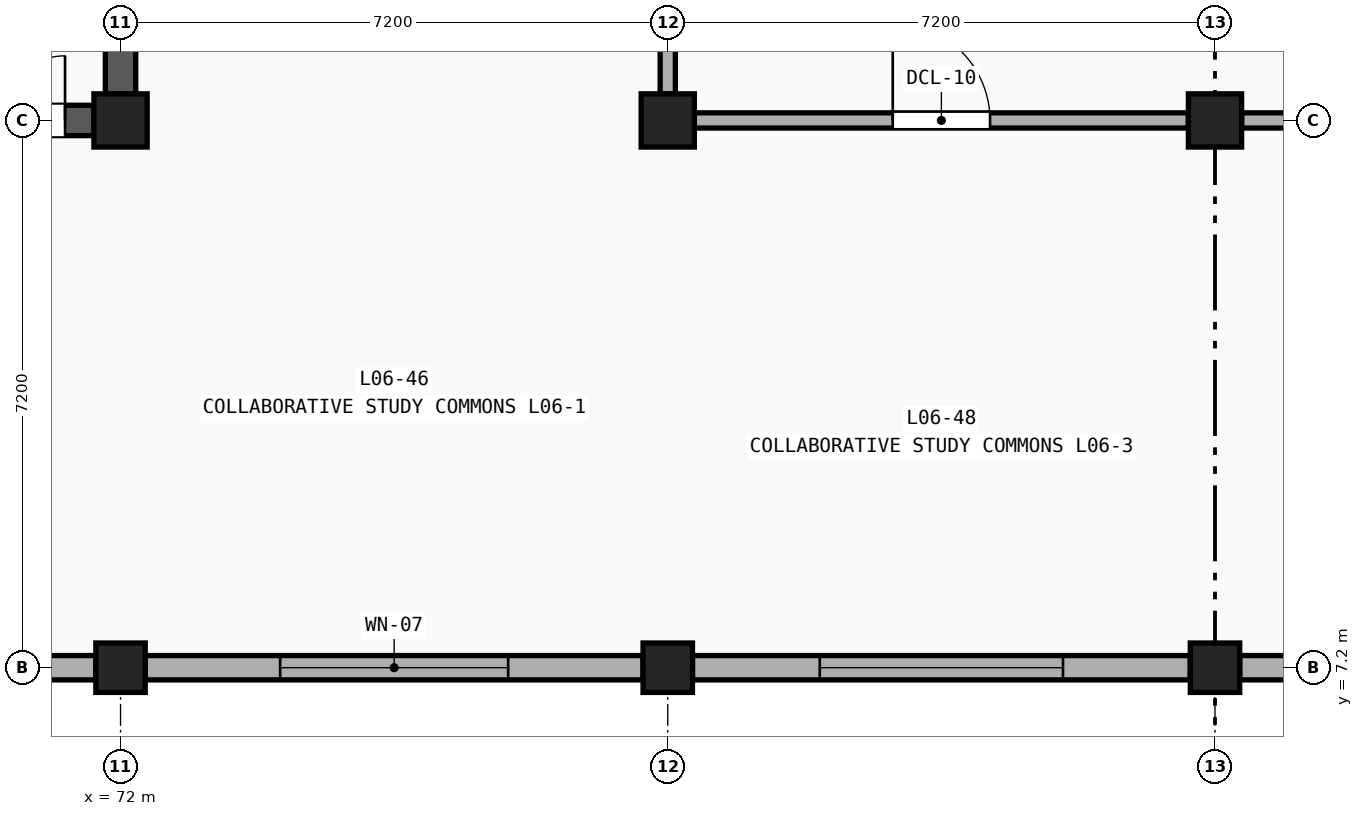
"""IFC4 building model, lengths in metres.
Left out: names, types, materials, properties, quantities, classifications, styles, units other than length and angle.
Written with IfcOpenShell. Run it as: python <this file> out.ifc"""

import sys

from ifc_helpers import new_model, si_unit, direction, frame, frame_2d, origin, origin_2d, place, context, subcontext, project, spatial, rectangle, extrude, element, fill, save


model = new_model("IFC4")
c1 = context("Model", 3, precision=1e-05, world=origin(), true_north=direction((0.0, 1.0)))
c2 = subcontext(c1, "Body", "Model", "MODEL_VIEW")
j1 = project(units=[si_unit("LENGTHUNIT", "METRE"), si_unit("PLANEANGLEUNIT", "RADIAN")], contexts=[c1])
p1 = place(None, origin())
s1 = spatial("IfcSite", under=j1, at=p1, CompositionType="ELEMENT")
p2 = place(p1, origin())
s2 = spatial("IfcBuilding", under=s1, at=p2, CompositionType="ELEMENT")
p3 = place(p2, frame((0.0, 0.0, 26.6)))
s3 = spatial("IfcBuildingStorey", under=s2, at=p3, CompositionType="ELEMENT", Elevation=26.6)
p4 = place(p3, frame((72.0, 7.2, 0.0), z_axis=(0.0, 0.0, 1.0), x_axis=(1.0, 0.0, 0.0)))
e1 = element("IfcColumn", 1, at=p4, inside=s3, PredefinedType="COLUMN", context=c2, shape_type="SweptSolid", body=[
    extrude(rectangle(XDim=0.65, YDim=0.65, at=origin_2d()), origin(), (0.0, 0.0, 1.0), 4.0),
])
p5 = place(p3, frame((72.0, 14.4, 0.0), z_axis=(0.0, 0.0, 1.0), x_axis=(1.0, 0.0, 0.0)))
e2 = element("IfcColumn", 2, at=p5, inside=s3, PredefinedType="COLUMN", context=c2, shape_type="SweptSolid", body=[
    extrude(rectangle(XDim=0.7, YDim=0.7, at=origin_2d()), origin(), (0.0, 0.0, 1.0), 4.0),
])
p6 = place(p3, frame((79.2, 7.2, 0.0), z_axis=(0.0, 0.0, 1.0), x_axis=(1.0, 0.0, 0.0)))
e3 = element("IfcColumn", 3, at=p6, inside=s3, PredefinedType="COLUMN", context=c2, shape_type="SweptSolid", body=[
    extrude(rectangle(XDim=0.65, YDim=0.65, at=origin_2d()), origin(), (0.0, 0.0, 1.0), 4.0),
])
p7 = place(p3, frame((79.2, 14.4, 0.0), z_axis=(0.0, 0.0, 1.0), x_axis=(1.0, 0.0, 0.0)))
e4 = element("IfcColumn", 4, at=p7, inside=s3, PredefinedType="COLUMN", context=c2, shape_type="SweptSolid", body=[
    extrude(rectangle(XDim=0.7, YDim=0.7, at=origin_2d()), origin(), (0.0, 0.0, 1.0), 4.0),
])
p8 = place(p3, frame((86.4, 7.2, 0.0), z_axis=(0.0, 0.0, 1.0), x_axis=(1.0, 0.0, 0.0)))
e5 = element("IfcColumn", 5, at=p8, inside=s3, PredefinedType="COLUMN", context=c2, shape_type="SweptSolid", body=[
    extrude(rectangle(XDim=0.65, YDim=0.65, at=origin_2d()), origin(), (0.0, 0.0, 1.0), 4.0),
])
p9 = place(p3, frame((86.4, 14.4, 0.0), z_axis=(0.0, 0.0, 1.0), x_axis=(1.0, 0.0, 0.0)))
e6 = element("IfcColumn", 6, at=p9, inside=s3, PredefinedType="COLUMN", context=c2, shape_type="SweptSolid", body=[
    extrude(rectangle(XDim=0.7, YDim=0.7, at=origin_2d()), origin(), (0.0, 0.0, 1.0), 4.0),
])
p10 = place(p3, frame((65.05, 7.2, 0.0), z_axis=(0.0, 0.0, 1.0), x_axis=(1.0, 0.0, 0.0)))
e7 = element("IfcWall", 7, at=p10, inside=s3, PredefinedType="SOLIDWALL", context=c2, shape_type="SweptSolid", body=[
    extrude(rectangle(XDim=6.625, YDim=0.32, at=frame_2d((3.312, 0.0))), origin(), (0.0, 0.0, 1.0), 3.1),
])
p11 = place(p10, frame((1.913, 0.0, 0.9)))
e8 = element("IfcOpeningElement", 8, at=p11, cuts=e7, PredefinedType="OPENING", context=c2, shape_type="SweptSolid", body=[
    extrude(rectangle(XDim=2.8, YDim=1.8, at=frame_2d((1.4, 0.9))), frame((0.0, 0.172, 0.0), z_axis=(0.0, -1.0, 0.0), x_axis=(1.0, 0.0, 0.0)), (0.0, 0.0, 1.0), 0.344),
])
p12 = place(p3, frame((72.325, 7.2, 0.0), z_axis=(0.0, 0.0, 1.0), x_axis=(1.0, 0.0, 0.0)))
e9 = element("IfcWall", 9, at=p12, inside=s3, PredefinedType="SOLIDWALL", context=c2, shape_type="SweptSolid", body=[
    extrude(rectangle(XDim=6.55, YDim=0.32, at=frame_2d((3.275, 0.0))), origin(), (0.0, 0.0, 1.0), 3.1),
])
p13 = place(p12, frame((1.775, 0.0, 0.9)))
e10 = element("IfcOpeningElement", 10, at=p13, cuts=e9, PredefinedType="OPENING", context=c2, shape_type="SweptSolid", body=[
    extrude(rectangle(XDim=3.0, YDim=1.8, at=frame_2d((1.5, 0.9))), frame((0.0, 0.172, 0.0), z_axis=(0.0, -1.0, 0.0), x_axis=(1.0, 0.0, 0.0)), (0.0, 0.0, 1.0), 0.344),
])
p14 = place(p3, frame((79.525, 7.2, 0.0), z_axis=(0.0, 0.0, 1.0), x_axis=(1.0, 0.0, 0.0)))
e11 = element("IfcWall", 11, at=p14, inside=s3, PredefinedType="SOLIDWALL", context=c2, shape_type="SweptSolid", body=[
    extrude(rectangle(XDim=6.55, YDim=0.32, at=frame_2d((3.275, 0.0))), origin(), (0.0, 0.0, 1.0), 3.1),
])
p15 = place(p14, frame((1.675, 0.0, 0.9)))
e12 = element("IfcOpeningElement", 12, at=p15, cuts=e11, PredefinedType="OPENING", context=c2, shape_type="SweptSolid", body=[
    extrude(rectangle(XDim=3.2, YDim=1.8, at=frame_2d((1.6, 0.9))), frame((0.0, 0.172, 0.0), z_axis=(0.0, -1.0, 0.0), x_axis=(1.0, 0.0, 0.0)), (0.0, 0.0, 1.0), 0.344),
])
p16 = place(p3, frame((86.725, 7.2, 0.0), z_axis=(0.0, 0.0, 1.0), x_axis=(1.0, 0.0, 0.0)))
e13 = element("IfcWall", 13, at=p16, inside=s3, PredefinedType="SOLIDWALL", context=c2, shape_type="SweptSolid", body=[
    extrude(rectangle(XDim=6.55, YDim=0.32, at=frame_2d((3.275, 0.0))), origin(), (0.0, 0.0, 1.0), 3.1),
])
p17 = place(p16, frame((1.575, 0.0, 0.9)))
e14 = element("IfcOpeningElement", 14, at=p17, cuts=e13, PredefinedType="OPENING", context=c2, shape_type="SweptSolid", body=[
    extrude(rectangle(XDim=3.4, YDim=1.8, at=frame_2d((1.7, 0.9))), frame((0.0, 0.172, 0.0), z_axis=(0.0, -1.0, 0.0), x_axis=(1.0, 0.0, 0.0)), (0.0, 0.0, 1.0), 0.344),
])
p18 = place(p3, frame((72.0, 14.75, 0.0), z_axis=(0.0, 0.0, 1.0), x_axis=(0.0, 1.0, 0.0)))
e15 = element("IfcWall", 15, at=p18, inside=s3, PredefinedType="SHEAR", context=c2, shape_type="SweptSolid", body=[
    extrude(rectangle(XDim=6.5, YDim=0.4, at=frame_2d((3.25, 0.0))), origin(), (0.0, 0.0, 1.0), 2.96),
])
p19 = place(p18, frame((2.2, 0.0, 0.0)))
e16 = element("IfcOpeningElement", 16, at=p19, cuts=e15, PredefinedType="OPENING", context=c2, shape_type="SweptSolid", body=[
    extrude(rectangle(XDim=1.7, YDim=2.25, at=frame_2d((0.85, 1.125))), frame((0.0, 0.212, 0.0), z_axis=(0.0, -1.0, 0.0), x_axis=(1.0, 0.0, 0.0)), (0.0, 0.0, 1.0), 0.424),
])
p20 = place(p3, frame((65.15, 14.4, 0.0), z_axis=(0.0, 0.0, 1.0), x_axis=(1.0, 0.0, 0.0)))
e17 = element("IfcWall", 17, at=p20, inside=s3, PredefinedType="SHEAR", context=c2, shape_type="SweptSolid", body=[
    extrude(rectangle(XDim=6.5, YDim=0.4, at=frame_2d((3.25, 0.0))), origin(), (0.0, 0.0, 1.0), 2.96),
])
p21 = place(p20, frame((4.42, 0.0, 0.0)))
e18 = element("IfcOpeningElement", 18, at=p21, cuts=e17, PredefinedType="OPENING", context=c2, shape_type="SweptSolid", body=[
    extrude(rectangle(XDim=1.7, YDim=2.25, at=frame_2d((0.85, 1.125))), frame((0.0, 0.212, 0.0), z_axis=(0.0, -1.0, 0.0), x_axis=(1.0, 0.0, 0.0)), (0.0, 0.0, 1.0), 0.424),
])
p22 = place(p3, frame((79.55, 14.4, 0.0), z_axis=(0.0, 0.0, 1.0), x_axis=(1.0, 0.0, 0.0)))
e19 = element("IfcWall", 19, at=p22, inside=s3, PredefinedType="PARTITIONING", context=c2, shape_type="SweptSolid", body=[
    extrude(rectangle(XDim=6.5, YDim=0.2, at=frame_2d((3.25, 0.0))), origin(), (0.0, 0.0, 1.0), 2.96),
])
p23 = place(p22, frame((2.61, 0.0, 0.0)))
e20 = element("IfcOpeningElement", 20, at=p23, cuts=e19, PredefinedType="OPENING", context=c2, shape_type="SweptSolid", body=[
    extrude(rectangle(XDim=1.28, YDim=2.28, at=frame_2d((0.64, 1.14))), frame((0.0, 0.112, 0.0), z_axis=(0.0, -1.0, 0.0), x_axis=(1.0, 0.0, 0.0)), (0.0, 0.0, 1.0), 0.224),
])
for number, where, z_axis, x_axis in (
    (21, (79.2, 14.75, 0.0), (0.0, 0.0, 1.0), (0.0, 1.0, 0.0)),
    (22, (86.75, 14.4, 0.0), (0.0, 0.0, 1.0), (1.0, 0.0, 0.0)),
):
    element("IfcWall", number, at=place(p3, frame(where, z_axis=z_axis, x_axis=x_axis)), inside=s3, PredefinedType="PARTITIONING", context=c2, shape_type="SweptSolid", body=[
        extrude(rectangle(XDim=6.5, YDim=0.2, at=frame_2d((3.25, 0.0))), origin(), (0.0, 0.0, 1.0), 2.96),
    ])
p24 = place(p13, origin())
e23 = element("IfcWindow", 23, at=p24, inside=s3, PartitioningType="SINGLE_PANEL", PredefinedType="WINDOW", context=c2, shape_type="SweptSolid", body=[
    extrude(rectangle(XDim=3.0, YDim=1.8, at=frame_2d((1.5, 0.9))), frame((0.0, 0.03, 0.0), z_axis=(0.0, -1.0, 0.0), x_axis=(1.0, 0.0, 0.0)), (0.0, 0.0, 1.0), 0.06),
])
fill(e10, e23)
p25 = place(p15, origin())
e24 = element("IfcWindow", 24, at=p25, inside=s3, PartitioningType="SINGLE_PANEL", PredefinedType="WINDOW", context=c2, shape_type="SweptSolid", body=[
    extrude(rectangle(XDim=3.2, YDim=1.8, at=frame_2d((1.6, 0.9))), frame((0.0, 0.03, 0.0), z_axis=(0.0, -1.0, 0.0), x_axis=(1.0, 0.0, 0.0)), (0.0, 0.0, 1.0), 0.06),
])
fill(e12, e24)
p26 = place(p21, origin())
e25 = element("IfcDoor", 25, at=p26, inside=s3, OperationType="DOUBLE_DOOR_SINGLE_SWING", PredefinedType="DOOR", context=c2, shape_type="SweptSolid", body=[
    extrude(rectangle(XDim=1.7, YDim=2.25, at=frame_2d((0.85, 1.125))), frame((0.0, 0.025, 0.0), z_axis=(0.0, -1.0, 0.0), x_axis=(1.0, 0.0, 0.0)), (0.0, 0.0, 1.0), 0.05),
])
fill(e18, e25)
p27 = place(p23, origin())
e26 = element("IfcDoor", 26, at=p27, inside=s3, OperationType="SINGLE_SWING_LEFT", PredefinedType="DOOR", context=c2, shape_type="SweptSolid", body=[
    extrude(rectangle(XDim=1.28, YDim=2.28, at=frame_2d((0.64, 1.14))), frame((0.0, 0.025, 0.0), z_axis=(0.0, -1.0, 0.0), x_axis=(1.0, 0.0, 0.0)), (0.0, 0.0, 1.0), 0.05),
])
fill(e20, e26)
save(model, sys.argv[1])
